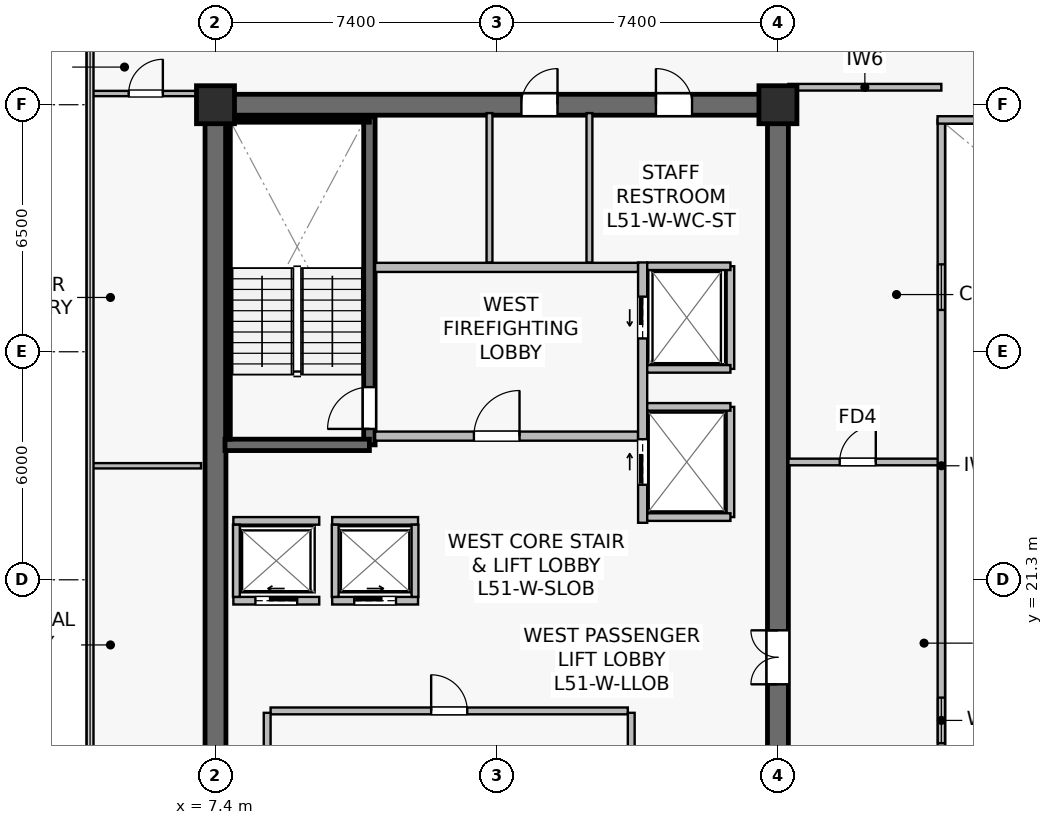
"""IFC4 building model, lengths in metres.
Left out: names, types, materials, properties, quantities, classifications, styles, units other than length and angle.
Written with IfcOpenShell. Run it as: python <this file> out.ifc"""

import sys

from ifc_helpers import new_model, si_unit, direction, frame, frame_2d, origin, origin_2d, place, context, subcontext, project, spatial, rectangle, extrude, source, transform, mapped, element, fill, save


model = new_model("IFC4")
c1 = context("Model", 3, precision=1e-05, world=origin(), true_north=direction((0.0, 1.0)))
c2 = subcontext(c1, "Body", "Model", "MODEL_VIEW")
j1 = project(units=[si_unit("LENGTHUNIT", "METRE"), si_unit("PLANEANGLEUNIT", "RADIAN")], contexts=[c1])
p1 = place(None, origin())
s1 = spatial("IfcSite", under=j1, at=p1, CompositionType="ELEMENT")
p2 = place(p1, origin())
s2 = spatial("IfcBuilding", under=s1, at=p2, CompositionType="ELEMENT")
p3 = place(p2, frame((0.0, 0.0, 213.7)))
s3 = spatial("IfcBuildingStorey", under=s2, at=p3, CompositionType="ELEMENT", Elevation=213.7)
p4 = place(p3, frame((7.125, 33.8, 0.0), z_axis=(0.0, 0.0, 1.0), x_axis=(1.0, 0.0, 0.0)))
e1 = element("IfcWall", 1, at=p4, inside=s3, PredefinedType="SHEAR", context=c2, shape_type="SweptSolid", body=[
    extrude(rectangle(XDim=15.35, YDim=0.55, at=frame_2d((7.675, 0.0))), origin(), (0.0, 0.0, 1.0), 3.8),
])
p5 = place(p4, frame((8.325, 0.0, 0.0)))
e2 = element("IfcOpeningElement", 2, at=p5, cuts=e1, PredefinedType="OPENING", context=c2, shape_type="SweptSolid", body=[
    extrude(rectangle(XDim=0.95, YDim=2.15, at=frame_2d((0.475, 1.075))), frame((0.0, 0.285, 0.0), z_axis=(0.0, -1.0, 0.0), x_axis=(1.0, 0.0, 0.0)), (0.0, 0.0, 1.0), 0.57),
])
p6 = place(p4, frame((11.865, 0.0, 0.0)))
e3 = element("IfcOpeningElement", 3, at=p6, cuts=e1, PredefinedType="OPENING", context=c2, shape_type="SweptSolid", body=[
    extrude(rectangle(XDim=0.95, YDim=2.15, at=frame_2d((0.475, 1.075))), frame((0.0, 0.285, 0.0), z_axis=(0.0, -1.0, 0.0), x_axis=(1.0, 0.0, 0.0)), (0.0, 0.0, 1.0), 0.57),
])
p7 = place(p3, frame((7.4, 15.075, 0.0), z_axis=(0.0, 0.0, 1.0), x_axis=(0.0, 1.0, 0.0)))
e4 = element("IfcWall", 4, at=p7, inside=s3, PredefinedType="SHEAR", context=c2, shape_type="SweptSolid", body=[
    extrude(rectangle(XDim=18.45, YDim=0.55, at=frame_2d((9.225, 0.0))), origin(), (0.0, 0.0, 1.0), 3.8),
])
p8 = place(p3, frame((22.2, 15.075, 0.0), z_axis=(0.0, 0.0, 1.0), x_axis=(0.0, 1.0, 0.0)))
e5 = element("IfcWall", 5, at=p8, inside=s3, PredefinedType="SHEAR", context=c2, shape_type="SweptSolid", body=[
    extrude(rectangle(XDim=18.45, YDim=0.55, at=frame_2d((9.225, 0.0))), origin(), (0.0, 0.0, 1.0), 3.8),
])
p9 = place(p8, frame((3.475, 0.0, 0.0)))
e6 = element("IfcOpeningElement", 6, at=p9, cuts=e5, PredefinedType="OPENING", context=c2, shape_type="SweptSolid", body=[
    extrude(rectangle(XDim=1.42, YDim=2.2, at=frame_2d((0.71, 1.1))), frame((0.0, 0.285, 0.0), z_axis=(0.0, -1.0, 0.0), x_axis=(1.0, 0.0, 0.0)), (0.0, 0.0, 1.0), 0.57),
])
p10 = place(p3, frame((11.45, 24.85, 0.0), z_axis=(0.0, 0.0, 1.0), x_axis=(0.0, 1.0, 0.0)))
e7 = element("IfcWall", 7, at=p10, inside=s3, PredefinedType="SHEAR", context=c2, shape_type="SweptSolid", body=[
    extrude(rectangle(XDim=8.63, YDim=0.3, at=frame_2d((4.315, 0.0))), origin(), (0.0, 0.0, 1.0), 3.8),
])
p11 = place(p10, frame((0.42, 0.0, 0.0)))
e8 = element("IfcOpeningElement", 8, at=p11, cuts=e7, PredefinedType="OPENING", context=c2, shape_type="SweptSolid", body=[
    extrude(rectangle(XDim=1.1, YDim=2.15, at=frame_2d((0.55, 1.075))), frame((0.0, 0.16, 0.0), z_axis=(0.0, -1.0, 0.0), x_axis=(1.0, 0.0, 0.0)), (0.0, 0.0, 1.0), 0.32),
])
p12 = place(p3, frame((7.65, 24.85, 0.0), z_axis=(0.0, 0.0, 1.0), x_axis=(1.0, 0.0, 0.0)))
e9 = element("IfcWall", 9, at=p12, inside=s3, PredefinedType="SHEAR", context=c2, shape_type="SweptSolid", body=[
    extrude(rectangle(XDim=3.8, YDim=0.3, at=frame_2d((1.9, 0.0))), origin(), (0.0, 0.0, 1.0), 3.8),
])
p13 = place(p3, frame((7.73, 33.4, 0.0), z_axis=(0.0, 0.0, 1.0), x_axis=(1.0, 0.0, 0.0)))
e10 = element("IfcWall", 10, at=p13, inside=s3, PredefinedType="SOLIDWALL", context=c2, shape_type="SweptSolid", body=[
    extrude(rectangle(XDim=3.72, YDim=0.12, at=frame_2d((1.86, 0.0))), origin(), (0.0, 0.0, 1.0), 3.8),
])
p14 = place(p3, frame((7.73, 25.0, 0.0), z_axis=(0.0, 0.0, 1.0), x_axis=(0.0, 1.0, 0.0)))
e11 = element("IfcWall", 11, at=p14, inside=s3, PredefinedType="SOLIDWALL", context=c2, shape_type="SweptSolid", body=[
    extrude(rectangle(XDim=8.32, YDim=0.12, at=frame_2d((4.16, 0.0))), origin(), (0.0, 0.0, 1.0), 3.8),
])
m1 = source(origin(), c2, "Body", "SweptSolid", [
    extrude(rectangle(XDim=1.0, YDim=1.0, at=origin_2d()), origin(), (0.0, 0.0, 1.0), 4.1),
])
for number, where, z_axis, x_axis in (
    (12, (7.4, 33.8, 0.0), (0.0, 0.0, 1.0), (1.0, 0.0, 0.0)),
    (13, (22.2, 33.8, 0.0), (0.0, 0.0, 1.0), (1.0, 0.0, 0.0)),
):
    element("IfcColumn", number, at=place(p3, frame(where, z_axis=z_axis, x_axis=x_axis)), inside=s3, PredefinedType="COLUMN", context=c2, shape_type="MappedRepresentation", body=[
        mapped(m1, transform((0.0, 0.0, 0.0), scale=1.0)),
    ])
p15 = place(p3, frame((11.6, 25.08, 0.0), z_axis=(0.0, 0.0, 1.0), x_axis=(1.0, 0.0, 0.0)))
e14 = element("IfcWall", 14, at=p15, inside=s3, PredefinedType="SOLIDWALL", context=c2, shape_type="SweptSolid", body=[
    extrude(rectangle(XDim=6.92, YDim=0.24, at=frame_2d((3.46, 0.0))), origin(), (0.0, 0.0, 1.0), 3.197),
])
p16 = place(p15, frame((2.6, 0.0, 0.0)))
e15 = element("IfcOpeningElement", 15, at=p16, cuts=e14, PredefinedType="OPENING", context=c2, shape_type="SweptSolid", body=[
    extrude(rectangle(XDim=1.2, YDim=2.16, at=frame_2d((0.6, 1.08))), frame((0.0, 0.13, 0.0), z_axis=(0.0, -1.0, 0.0), x_axis=(1.0, 0.0, 0.0)), (0.0, 0.0, 1.0), 0.26),
])
p17 = place(p3, frame((11.6, 29.52, 0.0), z_axis=(0.0, 0.0, 1.0), x_axis=(1.0, 0.0, 0.0)))
e16 = element("IfcWall", 16, at=p17, inside=s3, PredefinedType="SOLIDWALL", context=c2, shape_type="SweptSolid", body=[
    extrude(rectangle(XDim=6.92, YDim=0.24, at=frame_2d((3.46, 0.0))), origin(), (0.0, 0.0, 1.0), 3.197),
])
p18 = place(p3, frame((18.64, 22.8, 0.0), z_axis=(0.0, 0.0, 1.0), x_axis=(0.0, 1.0, 0.0)))
e17 = element("IfcWall", 17, at=p18, inside=s3, PredefinedType="SOLIDWALL", context=c2, shape_type="SweptSolid", body=[
    extrude(rectangle(XDim=6.85, YDim=0.24, at=frame_2d((3.425, 0.0))), origin(), (0.0, 0.0, 1.0), 2.935),
])
p19 = place(p18, frame((4.85, 0.0, 0.0)))
e18 = element("IfcOpeningElement", 18, at=p19, cuts=e17, PredefinedType="OPENING", context=c2, shape_type="SweptSolid", body=[
    extrude(rectangle(XDim=1.1, YDim=2.22, at=frame_2d((0.55, 1.11))), frame((0.0, 0.13, 0.0), z_axis=(0.0, -1.0, 0.0), x_axis=(1.0, 0.0, 0.0)), (0.0, 0.0, 1.0), 0.26),
])
p20 = place(p18, frame((1.0, 0.0, 0.0)))
e19 = element("IfcOpeningElement", 19, at=p20, cuts=e17, PredefinedType="OPENING", context=c2, shape_type="SweptSolid", body=[
    extrude(rectangle(XDim=1.2, YDim=2.22, at=frame_2d((0.6, 1.11))), frame((0.0, 0.13, 0.0), z_axis=(0.0, -1.0, 0.0), x_axis=(1.0, 0.0, 0.0)), (0.0, 0.0, 1.0), 0.26),
])
p21 = place(p3, frame((7.87, 20.75, 0.0), z_axis=(0.0, 0.0, 1.0), x_axis=(1.0, 0.0, 0.0)))
e20 = element("IfcWall", 20, at=p21, inside=s3, PredefinedType="SOLIDWALL", context=c2, shape_type="SweptSolid", body=[
    extrude(rectangle(XDim=2.26, YDim=0.2, at=frame_2d((1.13, 0.0))), origin(), (0.0, 0.0, 1.0), 3.8),
])
p22 = place(p21, frame((0.58, 0.0, 0.0)))
e21 = element("IfcOpeningElement", 21, at=p22, cuts=e20, PredefinedType="OPENING", context=c2, shape_type="SweptSolid", body=[
    extrude(rectangle(XDim=1.1, YDim=2.22, at=frame_2d((0.55, 1.11))), frame((0.0, 0.11, 0.0), z_axis=(0.0, -1.0, 0.0), x_axis=(1.0, 0.0, 0.0)), (0.0, 0.0, 1.0), 0.22),
])
p23 = place(p3, frame((7.87, 22.85, 0.0), z_axis=(0.0, 0.0, 1.0), x_axis=(1.0, 0.0, 0.0)))
e22 = element("IfcWall", 22, at=p23, inside=s3, PredefinedType="SOLIDWALL", context=c2, shape_type="SweptSolid", body=[
    extrude(rectangle(XDim=2.26, YDim=0.2, at=frame_2d((1.13, 0.0))), origin(), (0.0, 0.0, 1.0), 3.8),
])
p24 = place(p3, frame((7.95, 20.85, 0.0), z_axis=(0.0, 0.0, 1.0), x_axis=(0.0, 1.0, 0.0)))
e23 = element("IfcWall", 23, at=p24, inside=s3, PredefinedType="SOLIDWALL", context=c2, shape_type="SweptSolid", body=[
    extrude(rectangle(XDim=1.9, YDim=0.18, at=frame_2d((0.95, 0.0))), origin(), (0.0, 0.0, 1.0), 3.8),
])
p25 = place(p3, frame((10.47, 20.75, 0.0), z_axis=(0.0, 0.0, 1.0), x_axis=(1.0, 0.0, 0.0)))
e24 = element("IfcWall", 24, at=p25, inside=s3, PredefinedType="SOLIDWALL", context=c2, shape_type="SweptSolid", body=[
    extrude(rectangle(XDim=2.26, YDim=0.2, at=frame_2d((1.13, 0.0))), origin(), (0.0, 0.0, 1.0), 3.8),
])
p26 = place(p25, frame((0.58, 0.0, 0.0)))
e25 = element("IfcOpeningElement", 25, at=p26, cuts=e24, PredefinedType="OPENING", context=c2, shape_type="SweptSolid", body=[
    extrude(rectangle(XDim=1.1, YDim=2.22, at=frame_2d((0.55, 1.11))), frame((0.0, 0.11, 0.0), z_axis=(0.0, -1.0, 0.0), x_axis=(1.0, 0.0, 0.0)), (0.0, 0.0, 1.0), 0.22),
])
p27 = place(p3, frame((10.47, 22.85, 0.0), z_axis=(0.0, 0.0, 1.0), x_axis=(1.0, 0.0, 0.0)))
e26 = element("IfcWall", 26, at=p27, inside=s3, PredefinedType="SOLIDWALL", context=c2, shape_type="SweptSolid", body=[
    extrude(rectangle(XDim=2.26, YDim=0.2, at=frame_2d((1.13, 0.0))), origin(), (0.0, 0.0, 1.0), 3.8),
])
for number, where, z_axis, x_axis in (
    (27, (10.55, 20.85, 0.0), (0.0, 0.0, 1.0), (0.0, 1.0, 0.0)),
    (28, (12.65, 20.85, 0.0), (0.0, 0.0, 1.0), (0.0, 1.0, 0.0)),
):
    element("IfcWall", number, at=place(p3, frame(where, z_axis=z_axis, x_axis=x_axis)), inside=s3, PredefinedType="SOLIDWALL", context=c2, shape_type="SweptSolid", body=[
        extrude(rectangle(XDim=1.9, YDim=0.18, at=frame_2d((0.95, 0.0))), origin(), (0.0, 0.0, 1.0), 3.8),
    ])
p28 = place(p3, frame((20.95, 26.85, 0.0), z_axis=(0.0, 0.0, 1.0), x_axis=(0.0, 1.0, 0.0)))
e29 = element("IfcWall", 29, at=p28, inside=s3, PredefinedType="SOLIDWALL", context=c2, shape_type="SweptSolid", body=[
    extrude(rectangle(XDim=2.7, YDim=0.2, at=frame_2d((1.35, 0.0))), origin(), (0.0, 0.0, 1.0), 3.8),
])
p29 = place(p3, frame((18.76, 29.55, 0.0), z_axis=(0.0, 0.0, 1.0), x_axis=(1.0, 0.0, 0.0)))
e30 = element("IfcWall", 30, at=p29, inside=s3, PredefinedType="SOLIDWALL", context=c2, shape_type="SweptSolid", body=[
    extrude(rectangle(XDim=2.19, YDim=0.2, at=frame_2d((1.095, 0.0))), origin(), (0.0, 0.0, 1.0), 3.8),
])
p30 = place(p3, frame((18.76, 26.85, 0.0), z_axis=(0.0, 0.0, 1.0), x_axis=(1.0, 0.0, 0.0)))
e31 = element("IfcWall", 31, at=p30, inside=s3, PredefinedType="SOLIDWALL", context=c2, shape_type="SweptSolid", body=[
    extrude(rectangle(XDim=2.19, YDim=0.2, at=frame_2d((1.095, 0.0))), origin(), (0.0, 0.0, 1.0), 3.197),
])
p31 = place(p3, frame((20.95, 22.95, 0.0), z_axis=(0.0, 0.0, 1.0), x_axis=(0.0, 1.0, 0.0)))
e32 = element("IfcWall", 32, at=p31, inside=s3, PredefinedType="SOLIDWALL", context=c2, shape_type="SweptSolid", body=[
    extrude(rectangle(XDim=2.9, YDim=0.2, at=frame_2d((1.45, 0.0))), origin(), (0.0, 0.0, 1.0), 2.935),
])
for number, where, z_axis, x_axis in (
    (33, (18.76, 25.85, 0.0), (0.0, 0.0, 1.0), (1.0, 0.0, 0.0)),
    (34, (18.76, 22.95, 0.0), (0.0, 0.0, 1.0), (1.0, 0.0, 0.0)),
):
    element("IfcWall", number, at=place(p3, frame(where, z_axis=z_axis, x_axis=x_axis)), inside=s3, PredefinedType="SOLIDWALL", context=c2, shape_type="SweptSolid", body=[
        extrude(rectangle(XDim=2.19, YDim=0.2, at=frame_2d((1.095, 0.0))), origin(), (0.0, 0.0, 1.0), 3.8),
    ])
p32 = place(p3, frame((8.85, 17.85, 0.0), z_axis=(0.0, 0.0, 1.0), x_axis=(1.0, 0.0, 0.0)))
e35 = element("IfcWall", 35, at=p32, inside=s3, PredefinedType="SOLIDWALL", context=c2, shape_type="SweptSolid", body=[
    extrude(rectangle(XDim=9.4, YDim=0.18, at=frame_2d((4.7, 0.0))), origin(), (0.0, 0.0, 1.0), 3.197),
])
p33 = place(p32, frame((4.225, 0.0, 0.0)))
e36 = element("IfcOpeningElement", 36, at=p33, cuts=e35, PredefinedType="OPENING", context=c2, shape_type="SweptSolid", body=[
    extrude(rectangle(XDim=0.95, YDim=2.15, at=frame_2d((0.475, 1.075))), frame((0.0, 0.1, 0.0), z_axis=(0.0, -1.0, 0.0), x_axis=(1.0, 0.0, 0.0)), (0.0, 0.0, 1.0), 0.2),
])
for number, where, z_axis, x_axis in (
    (37, (18.34, 15.4, 0.0), (0.0, 0.0, 1.0), (0.0, 1.0, 0.0)),
    (38, (8.76, 15.4, 0.0), (0.0, 0.0, 1.0), (0.0, 1.0, 0.0)),
):
    element("IfcWall", number, at=place(p3, frame(where, z_axis=z_axis, x_axis=x_axis)), inside=s3, PredefinedType="SOLIDWALL", context=c2, shape_type="SweptSolid", body=[
        extrude(rectangle(XDim=2.4, YDim=0.18, at=frame_2d((1.2, 0.0))), origin(), (0.0, 0.0, 1.0), 3.8),
    ])
p34 = place(p3, frame((14.61, 29.65, 0.0), z_axis=(0.0, 0.0, 1.0), x_axis=(0.0, 1.0, 0.0)))
e39 = element("IfcWall", 39, at=p34, inside=s3, PredefinedType="PLUMBINGWALL", context=c2, shape_type="SweptSolid", body=[
    extrude(rectangle(XDim=3.93, YDim=0.155, at=frame_2d((1.965, 0.0))), origin(), (0.0, 0.0, 1.0), 3.197),
])
p35 = place(p3, frame((17.24, 29.65, 0.0), z_axis=(0.0, 0.0, 1.0), x_axis=(0.0, 1.0, 0.0)))
e40 = element("IfcWall", 40, at=p35, inside=s3, PredefinedType="PLUMBINGWALL", context=c2, shape_type="SweptSolid", body=[
    extrude(rectangle(XDim=3.93, YDim=0.155, at=frame_2d((1.965, 0.0))), origin(), (0.0, 0.0, 1.0), 3.8),
])
p36 = place(p3, frame((22.475, 34.26, 0.0), z_axis=(0.0, 0.0, 1.0), x_axis=(1.0, 0.0, 0.0)))
e41 = element("IfcWall", 41, at=p36, inside=s3, PredefinedType="PARTITIONING", context=c2, shape_type="SweptSolid", body=[
    extrude(rectangle(XDim=4.025, YDim=0.175, at=frame_2d((2.012, 0.0))), origin(), (0.0, 0.0, 1.0), 3.485),
])
p37 = place(p3, frame((22.475, 24.4, 0.0), z_axis=(0.0, 0.0, 1.0), x_axis=(1.0, 0.0, 0.0)))
e42 = element("IfcWall", 42, at=p37, inside=s3, PredefinedType="PARTITIONING", context=c2, shape_type="SweptSolid", body=[
    extrude(rectangle(XDim=4.025, YDim=0.175, at=frame_2d((2.012, 0.0))), origin(), (0.0, 0.0, 1.0), 3.8),
])
p38 = place(p37, frame((1.35, 0.0, 0.0)))
e43 = element("IfcOpeningElement", 43, at=p38, cuts=e42, PredefinedType="OPENING", context=c2, shape_type="SweptSolid", body=[
    extrude(rectangle(XDim=0.95, YDim=2.15, at=frame_2d((0.475, 1.075))), frame((0.0, 0.098, 0.0), z_axis=(0.0, -1.0, 0.0), x_axis=(1.0, 0.0, 0.0)), (0.0, 0.0, 1.0), 0.195),
])
p39 = place(p3, frame((26.5, 15.2, 0.0), z_axis=(0.0, 0.0, 1.0), x_axis=(0.0, 1.0, 0.0)))
e44 = element("IfcWall", 44, at=p39, inside=s3, PredefinedType="SOLIDWALL", context=c2, shape_type="SweptSolid", body=[
    extrude(rectangle(XDim=18.2, YDim=0.195, at=frame_2d((9.1, 0.0))), origin(), (0.0, 0.0, 1.0), 3.8),
])
p40 = place(p39, frame((1.8, 0.0, 0.9)))
e45 = element("IfcOpeningElement", 45, at=p40, cuts=e44, PredefinedType="OPENING", context=c2, shape_type="SweptSolid", body=[
    extrude(rectangle(XDim=1.2, YDim=1.35, at=frame_2d((0.6, 0.675))), frame((0.0, 0.107, 0.0), z_axis=(0.0, -1.0, 0.0), x_axis=(1.0, 0.0, 0.0)), (0.0, 0.0, 1.0), 0.215),
])
p41 = place(p39, frame((13.2, 0.0, 0.9)))
e46 = element("IfcOpeningElement", 46, at=p41, cuts=e44, PredefinedType="OPENING", context=c2, shape_type="SweptSolid", body=[
    extrude(rectangle(XDim=1.2, YDim=1.35, at=frame_2d((0.6, 0.675))), frame((0.0, 0.107, 0.0), z_axis=(0.0, -1.0, 0.0), x_axis=(1.0, 0.0, 0.0)), (0.0, 0.0, 1.0), 0.215),
])
p42 = place(p3, frame((26.4, 33.4, 0.0), z_axis=(0.0, 0.0, 1.0), x_axis=(1.0, 0.0, 0.0)))
e47 = element("IfcWall", 47, at=p42, inside=s3, PredefinedType="SOLIDWALL", context=c2, shape_type="SweptSolid", body=[
    extrude(rectangle(XDim=22.0, YDim=0.195, at=frame_2d((11.0, 0.0))), origin(), (0.0, 0.0, 1.0), 3.8),
])
p43 = place(p3, frame((4.11, 24.3, 0.0), z_axis=(0.0, 0.0, 1.0), x_axis=(1.0, 0.0, 0.0)))
e48 = element("IfcWall", 48, at=p43, inside=s3, PredefinedType="PARTITIONING", context=c2, shape_type="SweptSolid", body=[
    extrude(rectangle(XDim=2.91, YDim=0.14, at=frame_2d((1.455, 0.0))), origin(), (0.0, 0.0, 1.0), 3.8),
])
p44 = place(p3, frame((4.11, 34.095, 0.0), z_axis=(0.0, 0.0, 1.0), x_axis=(1.0, 0.0, 0.0)))
e49 = element("IfcWall", 49, at=p44, inside=s3, PredefinedType="PARTITIONING", context=c2, shape_type="SweptSolid", body=[
    extrude(rectangle(XDim=2.91, YDim=0.14, at=frame_2d((1.455, 0.0))), origin(), (0.0, 0.0, 1.0), 3.8),
])
p45 = place(p44, frame((1.005, 0.0, 0.0)))
e50 = element("IfcOpeningElement", 50, at=p45, cuts=e49, PredefinedType="OPENING", context=c2, shape_type="SweptSolid", body=[
    extrude(rectangle(XDim=0.9, YDim=2.1, at=frame_2d((0.45, 1.05))), frame((0.0, 0.08, 0.0), z_axis=(0.0, -1.0, 0.0), x_axis=(1.0, 0.0, 0.0)), (0.0, 0.0, 1.0), 0.16),
])
m2 = source(origin(), c2, "Body", "SweptSolid", [
    extrude(rectangle(XDim=1.2, YDim=1.35, at=frame_2d((0.6, 0.675))), frame((0.0, 0.03, 0.0), z_axis=(0.0, -1.0, 0.0), x_axis=(1.0, 0.0, 0.0)), (0.0, 0.0, 1.0), 0.06),
])
p46 = place(p40, origin())
e51 = element("IfcWindow", 51, at=p46, inside=s3, PartitioningType="SINGLE_PANEL", PredefinedType="WINDOW", context=c2, shape_type="MappedRepresentation", body=[
    mapped(m2, transform((0.0, 0.0, 0.0), scale=1.0)),
])
fill(e45, e51)
p47 = place(p41, origin())
e52 = element("IfcWindow", 52, at=p47, inside=s3, PartitioningType="SINGLE_PANEL", PredefinedType="WINDOW", context=c2, shape_type="MappedRepresentation", body=[
    mapped(m2, transform((0.0, 0.0, 0.0), scale=1.0)),
])
fill(e46, e52)
m3 = source(origin(), c2, "Body", "SweptSolid", [
    extrude(rectangle(XDim=1.1, YDim=2.15, at=frame_2d((0.55, 1.075))), frame((0.0, 0.025, 0.0), z_axis=(0.0, -1.0, 0.0), x_axis=(1.0, 0.0, 0.0)), (0.0, 0.0, 1.0), 0.05),
])
p48 = place(p11, origin())
e53 = element("IfcDoor", 53, at=p48, inside=s3, OperationType="SINGLE_SWING_LEFT", PredefinedType="DOOR", context=c2, shape_type="MappedRepresentation", body=[
    mapped(m3, transform((0.0, 0.0, 0.0), scale=1.0)),
])
fill(e8, e53)
m4 = source(origin(), c2, "Body", "SweptSolid", [
    extrude(rectangle(XDim=1.2, YDim=2.16, at=frame_2d((0.6, 1.08))), frame((0.0, 0.025, 0.0), z_axis=(0.0, -1.0, 0.0), x_axis=(1.0, 0.0, 0.0)), (0.0, 0.0, 1.0), 0.05),
])
p49 = place(p16, origin())
e54 = element("IfcDoor", 54, at=p49, inside=s3, OperationType="SINGLE_SWING_RIGHT", PredefinedType="DOOR", context=c2, shape_type="MappedRepresentation", body=[
    mapped(m4, transform((0.0, 0.0, 0.0), scale=1.0)),
])
fill(e15, e54)
m5 = source(origin(), c2, "Body", "SweptSolid", [
    extrude(rectangle(XDim=1.1, YDim=2.22, at=frame_2d((0.55, 1.11))), frame((0.0, 0.025, 0.0), z_axis=(0.0, -1.0, 0.0), x_axis=(1.0, 0.0, 0.0)), (0.0, 0.0, 1.0), 0.05),
])
p50 = place(p22, origin())
e55 = element("IfcDoor", 55, at=p50, inside=s3, OperationType="SLIDING_TO_LEFT", PredefinedType="USERDEFINED", context=c2, shape_type="MappedRepresentation", body=[
    mapped(m5, transform((0.0, 0.0, 0.0), scale=1.0)),
])
fill(e21, e55)
p51 = place(p26, origin())
e56 = element("IfcDoor", 56, at=p51, inside=s3, OperationType="SLIDING_TO_RIGHT", PredefinedType="USERDEFINED", context=c2, shape_type="MappedRepresentation", body=[
    mapped(m5, transform((0.0, 0.0, 0.0), scale=1.0)),
])
fill(e25, e56)
p52 = place(p19, origin())
e57 = element("IfcDoor", 57, at=p52, inside=s3, OperationType="SLIDING_TO_LEFT", PredefinedType="USERDEFINED", context=c2, shape_type="MappedRepresentation", body=[
    mapped(m5, transform((0.0, 0.0, 0.0), scale=1.0)),
])
fill(e18, e57)
m6 = source(origin(), c2, "Body", "SweptSolid", [
    extrude(rectangle(XDim=1.2, YDim=2.22, at=frame_2d((0.6, 1.11))), frame((0.0, 0.025, 0.0), z_axis=(0.0, -1.0, 0.0), x_axis=(1.0, 0.0, 0.0)), (0.0, 0.0, 1.0), 0.05),
])
p53 = place(p20, origin())
e58 = element("IfcDoor", 58, at=p53, inside=s3, OperationType="SLIDING_TO_RIGHT", PredefinedType="USERDEFINED", context=c2, shape_type="MappedRepresentation", body=[
    mapped(m6, transform((0.0, 0.0, 0.0), scale=1.0)),
])
fill(e19, e58)
m7 = source(origin(), c2, "Body", "SweptSolid", [
    extrude(rectangle(XDim=0.95, YDim=2.15, at=frame_2d((0.475, 1.075))), frame((0.0, 0.025, 0.0), z_axis=(0.0, -1.0, 0.0), x_axis=(1.0, 0.0, 0.0)), (0.0, 0.0, 1.0), 0.05),
])
p54 = place(p33, origin())
e59 = element("IfcDoor", 59, at=p54, inside=s3, OperationType="SINGLE_SWING_LEFT", PredefinedType="DOOR", context=c2, shape_type="MappedRepresentation", body=[
    mapped(m7, transform((0.0, 0.0, 0.0), scale=1.0)),
])
fill(e36, e59)
m8 = source(origin(), c2, "Body", "SweptSolid", [
    extrude(rectangle(XDim=1.42, YDim=2.2, at=frame_2d((0.71, 1.1))), frame((0.0, 0.025, 0.0), z_axis=(0.0, -1.0, 0.0), x_axis=(1.0, 0.0, 0.0)), (0.0, 0.0, 1.0), 0.05),
])
p55 = place(p9, origin())
e60 = element("IfcDoor", 60, at=p55, inside=s3, OperationType="DOUBLE_DOOR_SINGLE_SWING", PredefinedType="DOOR", context=c2, shape_type="MappedRepresentation", body=[
    mapped(m8, transform((0.0, 0.0, 0.0), scale=1.0)),
])
fill(e6, e60)
p56 = place(p5, origin())
e61 = element("IfcDoor", 61, at=p56, inside=s3, OperationType="SINGLE_SWING_RIGHT", PredefinedType="DOOR", context=c2, shape_type="MappedRepresentation", body=[
    mapped(m7, transform((0.0, 0.0, 0.0), scale=1.0)),
])
fill(e2, e61)
p57 = place(p6, origin())
e62 = element("IfcDoor", 62, at=p57, inside=s3, OperationType="SINGLE_SWING_LEFT", PredefinedType="DOOR", context=c2, shape_type="MappedRepresentation", body=[
    mapped(m7, transform((0.0, 0.0, 0.0), scale=1.0)),
])
fill(e3, e62)
p58 = place(p38, origin())
e63 = element("IfcDoor", 63, at=p58, inside=s3, OperationType="SINGLE_SWING_RIGHT", PredefinedType="DOOR", context=c2, shape_type="MappedRepresentation", body=[
    mapped(m7, transform((0.0, 0.0, 0.0), scale=1.0)),
])
fill(e43, e63)
m9 = source(origin(), c2, "Body", "SweptSolid", [
    extrude(rectangle(XDim=0.9, YDim=2.1, at=frame_2d((0.45, 1.05))), frame((0.0, 0.025, 0.0), z_axis=(0.0, -1.0, 0.0), x_axis=(1.0, 0.0, 0.0)), (0.0, 0.0, 1.0), 0.05),
])
p59 = place(p45, origin())
e64 = element("IfcDoor", 64, at=p59, inside=s3, OperationType="SINGLE_SWING_RIGHT", PredefinedType="DOOR", context=c2, shape_type="MappedRepresentation", body=[
    mapped(m9, transform((0.0, 0.0, 0.0), scale=1.0)),
])
fill(e50, e64)
save(model, sys.argv[1])
